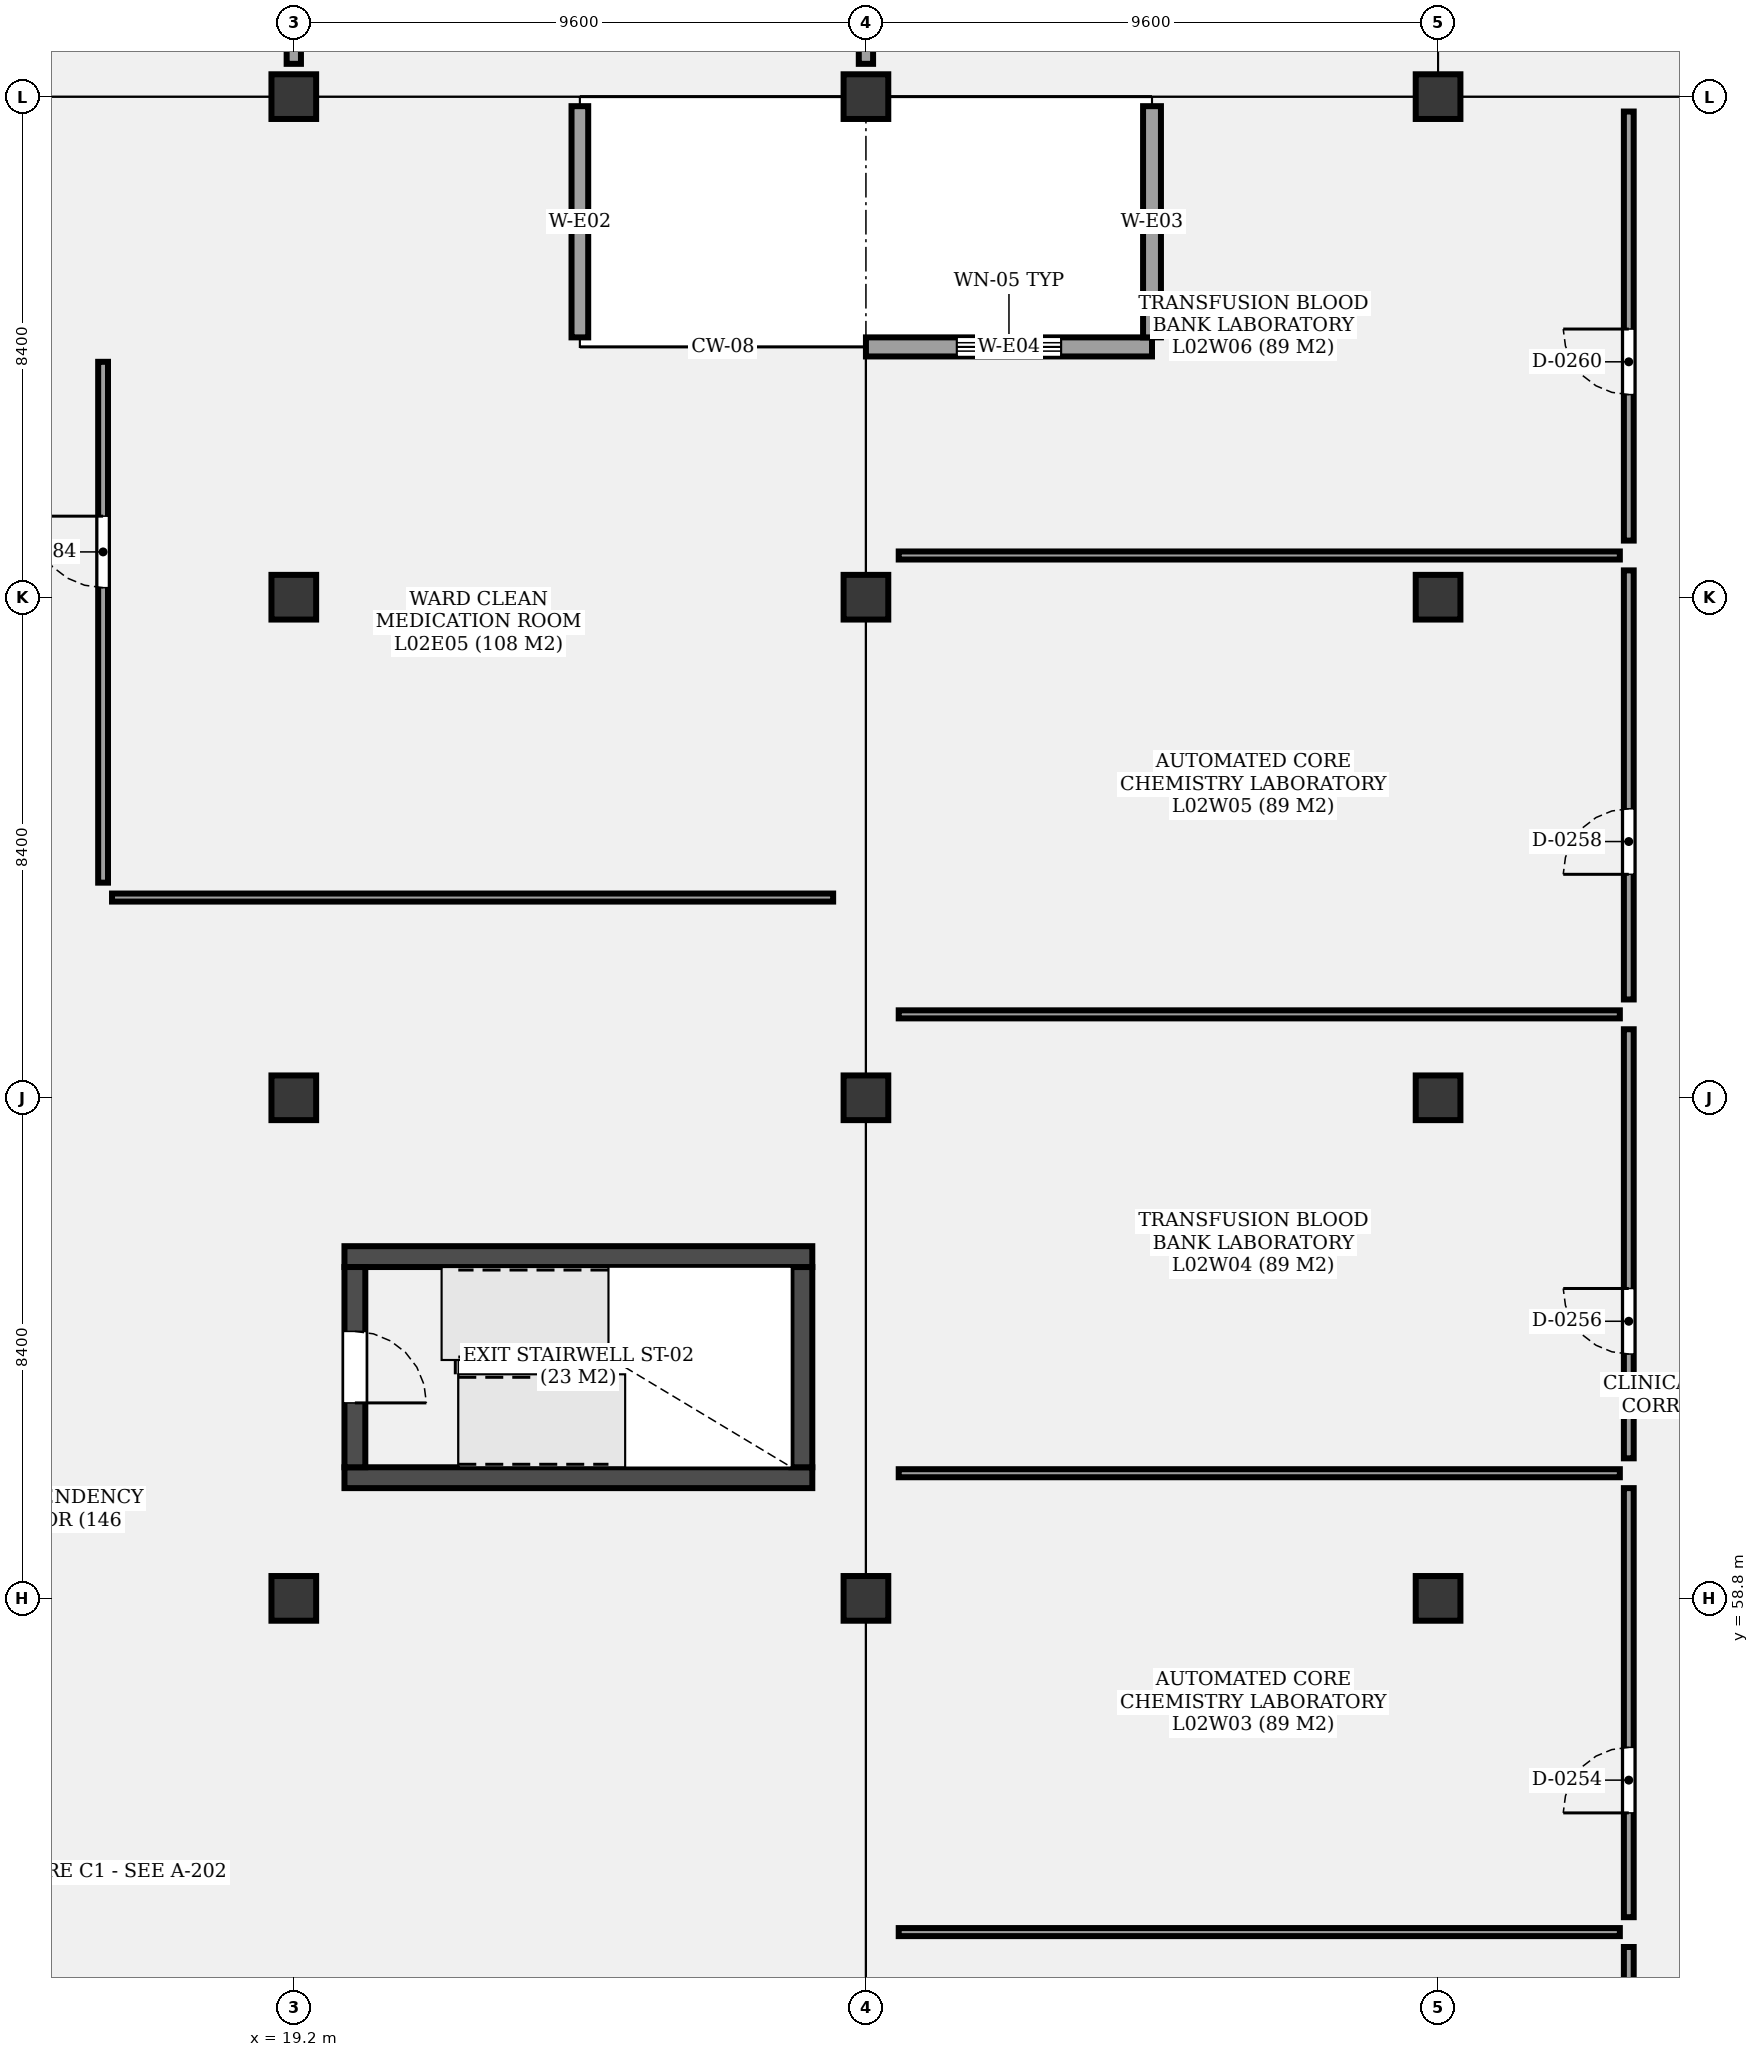
"""IFC4 building model, lengths in metres.
Left out: names, types, materials, properties, quantities, classifications, styles, units other than length and angle.
Written with IfcOpenShell. Run it as: python <this file> out.ifc"""

import sys

from ifc_helpers import new_model, si_unit, direction, frame, frame_2d, origin, origin_2d, place, context, subcontext, project, spatial, rectangle, extrude, element, fill, save


model = new_model("IFC4")
c1 = context("Model", 3, precision=1e-05, world=origin(), true_north=direction((0.0, 1.0)))
c2 = subcontext(c1, "Body", "Model", "MODEL_VIEW")
j1 = project(units=[si_unit("LENGTHUNIT", "METRE"), si_unit("PLANEANGLEUNIT", "RADIAN")], contexts=[c1])
p1 = place(None, origin())
s1 = spatial("IfcSite", under=j1, at=p1, CompositionType="ELEMENT")
p2 = place(p1, origin())
s2 = spatial("IfcBuilding", under=s1, at=p2, CompositionType="ELEMENT")
p3 = place(p2, frame((0.0, 0.0, 9.9)))
s3 = spatial("IfcBuildingStorey", under=s2, at=p3, CompositionType="ELEMENT", Elevation=9.9)
for number, where, z_axis, x_axis in (
    (1, (19.2, 58.8, 0.0), (0.0, 0.0, 1.0), (1.0, 0.0, 0.0)),
    (2, (19.2, 67.2, 0.0), (0.0, 0.0, 1.0), (1.0, 0.0, 0.0)),
    (3, (19.2, 75.6, 0.0), (0.0, 0.0, 1.0), (1.0, 0.0, 0.0)),
    (4, (19.2, 84.0, 0.0), (0.0, 0.0, 1.0), (1.0, 0.0, 0.0)),
    (5, (28.8, 58.8, 0.0), (0.0, 0.0, 1.0), (1.0, 0.0, 0.0)),
    (6, (28.8, 67.2, 0.0), (0.0, 0.0, 1.0), (1.0, 0.0, 0.0)),
    (7, (28.8, 75.6, 0.0), (0.0, 0.0, 1.0), (1.0, 0.0, 0.0)),
    (8, (28.8, 84.0, 0.0), (0.0, 0.0, 1.0), (1.0, 0.0, 0.0)),
    (9, (38.4, 58.8, 0.0), (0.0, 0.0, 1.0), (1.0, 0.0, 0.0)),
    (10, (38.4, 67.2, 0.0), (0.0, 0.0, 1.0), (1.0, 0.0, 0.0)),
    (11, (38.4, 75.6, 0.0), (0.0, 0.0, 1.0), (1.0, 0.0, 0.0)),
    (12, (38.4, 84.0, 0.0), (0.0, 0.0, 1.0), (1.0, 0.0, 0.0)),
):
    element("IfcColumn", number, at=place(p3, frame(where, z_axis=z_axis, x_axis=x_axis)), inside=s3, PredefinedType="COLUMN", context=c2, shape_type="SweptSolid", body=[
        extrude(rectangle(XDim=0.75, YDim=0.75, at=origin_2d()), origin(), (0.0, 0.0, 1.0), 3.6),
    ])
p4 = place(p3, frame((20.05, 60.825, 0.0), z_axis=(0.0, 0.0, 1.0), x_axis=(1.0, 0.0, 0.0)))
e13 = element("IfcWall", 13, at=p4, inside=s3, PredefinedType="SHEAR", context=c2, shape_type="SweptSolid", body=[
    extrude(rectangle(XDim=7.85, YDim=0.35, at=frame_2d((3.925, 0.0))), origin(), (0.0, 0.0, 1.0), 3.6),
])
p5 = place(p3, frame((27.725, 61.0, 0.0), z_axis=(0.0, 0.0, 1.0), x_axis=(0.0, 1.0, 0.0)))
e14 = element("IfcWall", 14, at=p5, inside=s3, PredefinedType="SHEAR", context=c2, shape_type="SweptSolid", body=[
    extrude(rectangle(XDim=3.36, YDim=0.35, at=frame_2d((1.68, 0.0))), origin(), (0.0, 0.0, 1.0), 3.6),
])
p6 = place(p3, frame((27.9, 64.535, 0.0), z_axis=(0.0, 0.0, 1.0), x_axis=(-1.0, 0.0, 0.0)))
e15 = element("IfcWall", 15, at=p6, inside=s3, PredefinedType="SHEAR", context=c2, shape_type="SweptSolid", body=[
    extrude(rectangle(XDim=7.85, YDim=0.35, at=frame_2d((3.925, 0.0))), origin(), (0.0, 0.0, 1.0), 3.6),
])
p7 = place(p3, frame((20.225, 64.36, 0.0), z_axis=(0.0, 0.0, 1.0), x_axis=(0.0, -1.0, 0.0)))
e16 = element("IfcWall", 16, at=p7, inside=s3, PredefinedType="SHEAR", context=c2, shape_type="SweptSolid", body=[
    extrude(rectangle(XDim=3.36, YDim=0.35, at=frame_2d((1.68, 0.0))), origin(), (0.0, 0.0, 1.0), 3.6),
])
p8 = place(p7, frame((1.08, 0.0, 0.0)))
e17 = element("IfcOpeningElement", 17, at=p8, cuts=e16, PredefinedType="OPENING", context=c2, shape_type="SweptSolid", body=[
    extrude(rectangle(XDim=1.2, YDim=2.2, at=frame_2d((0.6, 1.1))), frame((0.0, 0.185, 0.0), z_axis=(0.0, -1.0, 0.0), x_axis=(1.0, 0.0, 0.0)), (0.0, 0.0, 1.0), 0.37),
])
p9 = place(p3, frame((28.8, 79.8, 0.0), z_axis=(0.0, 0.0, 1.0), x_axis=(1.0, 0.0, 0.0)))
e18 = element("IfcWall", 18, at=p9, inside=s3, PredefinedType="SOLIDWALL", context=c2, shape_type="SweptSolid", body=[
    extrude(rectangle(XDim=4.8, YDim=0.32, at=frame_2d((2.4, 0.0))), origin(), (0.0, 0.0, 1.0), 2.57),
])
p10 = place(p9, frame((1.525, 0.0, 0.85)))
e19 = element("IfcOpeningElement", 19, at=p10, cuts=e18, PredefinedType="OPENING", context=c2, shape_type="SweptSolid", body=[
    extrude(rectangle(XDim=1.75, YDim=1.2, at=frame_2d((0.875, 0.6))), frame((0.0, 0.17, 0.0), z_axis=(0.0, -1.0, 0.0), x_axis=(1.0, 0.0, 0.0)), (0.0, 0.0, 1.0), 0.34),
])
p11 = place(p3, frame((24.0, 83.84, 0.0), z_axis=(0.0, 0.0, 1.0), x_axis=(0.0, -1.0, 0.0)))
e20 = element("IfcWall", 20, at=p11, inside=s3, PredefinedType="SOLIDWALL", context=c2, shape_type="SweptSolid", body=[
    extrude(rectangle(XDim=3.88, YDim=0.28, at=frame_2d((1.94, 0.0))), origin(), (0.0, 0.0, 1.0), 2.57),
])
p12 = place(p3, frame((33.6, 79.96, 0.0), z_axis=(0.0, 0.0, 1.0), x_axis=(0.0, 1.0, 0.0)))
e21 = element("IfcWall", 21, at=p12, inside=s3, PredefinedType="SOLIDWALL", context=c2, shape_type="SweptSolid", body=[
    extrude(rectangle(XDim=3.88, YDim=0.3, at=frame_2d((1.94, 0.0))), origin(), (0.0, 0.0, 1.0), 2.57),
])
for number, where, z_axis, x_axis in (
    (22, (19.2, 84.55, 0.0), (0.0, 0.0, 1.0), (0.0, 1.0, 0.0)),
    (23, (28.8, 84.55, 0.0), (0.0, 0.0, 1.0), (0.0, 1.0, 0.0)),
):
    element("IfcWall", number, at=place(p3, frame(where, z_axis=z_axis, x_axis=x_axis)), inside=s3, PredefinedType="PARTITIONING", context=c2, shape_type="SweptSolid", body=[
        extrude(rectangle(XDim=17.3, YDim=0.24, at=frame_2d((8.65, 0.0))), origin(), (0.0, 0.0, 1.0), 2.48),
    ])
p13 = place(p3, frame((41.6, 45.75, 0.0), z_axis=(0.0, 0.0, 1.0), x_axis=(0.0, 1.0, 0.0)))
e24 = element("IfcWall", 24, at=p13, inside=s3, PredefinedType="PARTITIONING", context=c2, shape_type="SweptSolid", body=[
    extrude(rectangle(XDim=7.2, YDim=0.165, at=frame_2d((3.6, 0.0))), origin(), (0.0, 0.0, 1.0), 2.48),
])
p14 = place(p13, frame((1.75, 0.0, 0.0)))
e25 = element("IfcOpeningElement", 25, at=p14, cuts=e24, PredefinedType="OPENING", context=c2, shape_type="SweptSolid", body=[
    extrude(rectangle(XDim=1.1, YDim=2.4, at=frame_2d((0.55, 1.2))), frame((0.0, 0.093, 0.0), z_axis=(0.0, -1.0, 0.0), x_axis=(1.0, 0.0, 0.0)), (0.0, 0.0, 1.0), 0.185),
])
p15 = place(p3, frame((41.6, 53.45, 0.0), z_axis=(0.0, 0.0, 1.0), x_axis=(0.0, 1.0, 0.0)))
e26 = element("IfcWall", 26, at=p15, inside=s3, PredefinedType="PARTITIONING", context=c2, shape_type="SweptSolid", body=[
    extrude(rectangle(XDim=7.2, YDim=0.165, at=frame_2d((3.6, 0.0))), origin(), (0.0, 0.0, 1.0), 2.48),
])
p16 = place(p15, frame((1.75, 0.0, 0.0)))
e27 = element("IfcOpeningElement", 27, at=p16, cuts=e26, PredefinedType="OPENING", context=c2, shape_type="SweptSolid", body=[
    extrude(rectangle(XDim=1.1, YDim=2.4, at=frame_2d((0.55, 1.2))), frame((0.0, 0.093, 0.0), z_axis=(0.0, -1.0, 0.0), x_axis=(1.0, 0.0, 0.0)), (0.0, 0.0, 1.0), 0.185),
])
p17 = place(p3, frame((29.35, 53.2, 0.0), z_axis=(0.0, 0.0, 1.0), x_axis=(1.0, 0.0, 0.0)))
e28 = element("IfcWall", 28, at=p17, inside=s3, PredefinedType="PARTITIONING", context=c2, shape_type="SweptSolid", body=[
    extrude(rectangle(XDim=12.1, YDim=0.135, at=frame_2d((6.05, 0.0))), origin(), (0.0, 0.0, 1.0), 2.48),
])
p18 = place(p3, frame((41.6, 61.15, 0.0), z_axis=(0.0, 0.0, 1.0), x_axis=(0.0, 1.0, 0.0)))
e29 = element("IfcWall", 29, at=p18, inside=s3, PredefinedType="PARTITIONING", context=c2, shape_type="SweptSolid", body=[
    extrude(rectangle(XDim=7.2, YDim=0.165, at=frame_2d((3.6, 0.0))), origin(), (0.0, 0.0, 1.0), 2.48),
])
p19 = place(p18, frame((1.75, 0.0, 0.0)))
e30 = element("IfcOpeningElement", 30, at=p19, cuts=e29, PredefinedType="OPENING", context=c2, shape_type="SweptSolid", body=[
    extrude(rectangle(XDim=1.1, YDim=2.4, at=frame_2d((0.55, 1.2))), frame((0.0, 0.093, 0.0), z_axis=(0.0, -1.0, 0.0), x_axis=(1.0, 0.0, 0.0)), (0.0, 0.0, 1.0), 0.185),
])
p20 = place(p3, frame((29.35, 60.9, 0.0), z_axis=(0.0, 0.0, 1.0), x_axis=(1.0, 0.0, 0.0)))
e31 = element("IfcWall", 31, at=p20, inside=s3, PredefinedType="PARTITIONING", context=c2, shape_type="SweptSolid", body=[
    extrude(rectangle(XDim=12.1, YDim=0.135, at=frame_2d((6.05, 0.0))), origin(), (0.0, 0.0, 1.0), 2.48),
])
p21 = place(p3, frame((41.6, 68.85, 0.0), z_axis=(0.0, 0.0, 1.0), x_axis=(0.0, 1.0, 0.0)))
e32 = element("IfcWall", 32, at=p21, inside=s3, PredefinedType="PARTITIONING", context=c2, shape_type="SweptSolid", body=[
    extrude(rectangle(XDim=7.2, YDim=0.165, at=frame_2d((3.6, 0.0))), origin(), (0.0, 0.0, 1.0), 2.48),
])
p22 = place(p21, frame((2.1, 0.0, 0.0)))
e33 = element("IfcOpeningElement", 33, at=p22, cuts=e32, PredefinedType="OPENING", context=c2, shape_type="SweptSolid", body=[
    extrude(rectangle(XDim=1.1, YDim=2.4, at=frame_2d((0.55, 1.2))), frame((0.0, 0.093, 0.0), z_axis=(0.0, -1.0, 0.0), x_axis=(1.0, 0.0, 0.0)), (0.0, 0.0, 1.0), 0.185),
])
p23 = place(p3, frame((29.35, 68.6, 0.0), z_axis=(0.0, 0.0, 1.0), x_axis=(1.0, 0.0, 0.0)))
e34 = element("IfcWall", 34, at=p23, inside=s3, PredefinedType="PARTITIONING", context=c2, shape_type="SweptSolid", body=[
    extrude(rectangle(XDim=12.1, YDim=0.135, at=frame_2d((6.05, 0.0))), origin(), (0.0, 0.0, 1.0), 2.48),
])
p24 = place(p3, frame((41.6, 76.55, 0.0), z_axis=(0.0, 0.0, 1.0), x_axis=(0.0, 1.0, 0.0)))
e35 = element("IfcWall", 35, at=p24, inside=s3, PredefinedType="PARTITIONING", context=c2, shape_type="SweptSolid", body=[
    extrude(rectangle(XDim=7.2, YDim=0.165, at=frame_2d((3.6, 0.0))), origin(), (0.0, 0.0, 1.0), 2.48),
])
p25 = place(p24, frame((2.45, 0.0, 0.0)))
e36 = element("IfcOpeningElement", 36, at=p25, cuts=e35, PredefinedType="OPENING", context=c2, shape_type="SweptSolid", body=[
    extrude(rectangle(XDim=1.1, YDim=2.4, at=frame_2d((0.55, 1.2))), frame((0.0, 0.093, 0.0), z_axis=(0.0, -1.0, 0.0), x_axis=(1.0, 0.0, 0.0)), (0.0, 0.0, 1.0), 0.185),
])
p26 = place(p3, frame((29.35, 76.3, 0.0), z_axis=(0.0, 0.0, 1.0), x_axis=(1.0, 0.0, 0.0)))
e37 = element("IfcWall", 37, at=p26, inside=s3, PredefinedType="PARTITIONING", context=c2, shape_type="SweptSolid", body=[
    extrude(rectangle(XDim=12.1, YDim=0.135, at=frame_2d((6.05, 0.0))), origin(), (0.0, 0.0, 1.0), 2.48),
])
p27 = place(p3, frame((16.0, 70.81, 0.0), z_axis=(0.0, 0.0, 1.0), x_axis=(0.0, 1.0, 0.0)))
e38 = element("IfcWall", 38, at=p27, inside=s3, PredefinedType="PARTITIONING", context=c2, shape_type="SweptSolid", body=[
    extrude(rectangle(XDim=8.74, YDim=0.165, at=frame_2d((4.37, 0.0))), origin(), (0.0, 0.0, 1.0), 2.48),
])
p28 = place(p27, frame((4.95, 0.0, 0.0)))
e39 = element("IfcOpeningElement", 39, at=p28, cuts=e38, PredefinedType="OPENING", context=c2, shape_type="SweptSolid", body=[
    extrude(rectangle(XDim=1.2, YDim=2.4, at=frame_2d((0.6, 1.2))), frame((0.0, 0.093, 0.0), z_axis=(0.0, -1.0, 0.0), x_axis=(1.0, 0.0, 0.0)), (0.0, 0.0, 1.0), 0.185),
])
p29 = place(p3, frame((16.15, 70.56, 0.0), z_axis=(0.0, 0.0, 1.0), x_axis=(1.0, 0.0, 0.0)))
e40 = element("IfcWall", 40, at=p29, inside=s3, PredefinedType="PARTITIONING", context=c2, shape_type="SweptSolid", body=[
    extrude(rectangle(XDim=12.1, YDim=0.135, at=frame_2d((6.05, 0.0))), origin(), (0.0, 0.0, 1.0), 2.48),
])
p30 = place(p8, origin())
e41 = element("IfcDoor", 41, at=p30, inside=s3, OperationType="SINGLE_SWING_RIGHT", PredefinedType="DOOR", context=c2, shape_type="SweptSolid", body=[
    extrude(rectangle(XDim=1.2, YDim=2.2, at=frame_2d((0.6, 1.1))), frame((0.0, 0.025, 0.0), z_axis=(0.0, -1.0, 0.0), x_axis=(1.0, 0.0, 0.0)), (0.0, 0.0, 1.0), 0.05),
])
fill(e17, e41)
p31 = place(p10, origin())
e42 = element("IfcWindow", 42, at=p31, inside=s3, PartitioningType="SINGLE_PANEL", PredefinedType="WINDOW", context=c2, shape_type="SweptSolid", body=[
    extrude(rectangle(XDim=1.75, YDim=1.2, at=frame_2d((0.875, 0.6))), frame((0.0, 0.03, 0.0), z_axis=(0.0, -1.0, 0.0), x_axis=(1.0, 0.0, 0.0)), (0.0, 0.0, 1.0), 0.06),
])
fill(e19, e42)
p32 = place(p16, origin())
e43 = element("IfcDoor", 43, at=p32, inside=s3, OperationType="SINGLE_SWING_LEFT", PredefinedType="DOOR", context=c2, shape_type="SweptSolid", body=[
    extrude(rectangle(XDim=1.1, YDim=2.4, at=frame_2d((0.55, 1.2))), frame((0.0, 0.025, 0.0), z_axis=(0.0, -1.0, 0.0), x_axis=(1.0, 0.0, 0.0)), (0.0, 0.0, 1.0), 0.05),
])
fill(e27, e43)
p33 = place(p19, origin())
e44 = element("IfcDoor", 44, at=p33, inside=s3, OperationType="SINGLE_SWING_RIGHT", PredefinedType="DOOR", context=c2, shape_type="SweptSolid", body=[
    extrude(rectangle(XDim=1.1, YDim=2.4, at=frame_2d((0.55, 1.2))), frame((0.0, 0.025, 0.0), z_axis=(0.0, -1.0, 0.0), x_axis=(1.0, 0.0, 0.0)), (0.0, 0.0, 1.0), 0.05),
])
fill(e30, e44)
p34 = place(p22, origin())
e45 = element("IfcDoor", 45, at=p34, inside=s3, OperationType="SINGLE_SWING_LEFT", PredefinedType="DOOR", context=c2, shape_type="SweptSolid", body=[
    extrude(rectangle(XDim=1.1, YDim=2.4, at=frame_2d((0.55, 1.2))), frame((0.0, 0.025, 0.0), z_axis=(0.0, -1.0, 0.0), x_axis=(1.0, 0.0, 0.0)), (0.0, 0.0, 1.0), 0.05),
])
fill(e33, e45)
p35 = place(p25, origin())
e46 = element("IfcDoor", 46, at=p35, inside=s3, OperationType="SINGLE_SWING_RIGHT", PredefinedType="DOOR", context=c2, shape_type="SweptSolid", body=[
    extrude(rectangle(XDim=1.1, YDim=2.4, at=frame_2d((0.55, 1.2))), frame((0.0, 0.025, 0.0), z_axis=(0.0, -1.0, 0.0), x_axis=(1.0, 0.0, 0.0)), (0.0, 0.0, 1.0), 0.05),
])
fill(e36, e46)
p36 = place(p28, origin())
e47 = element("IfcDoor", 47, at=p36, inside=s3, OperationType="SINGLE_SWING_RIGHT", PredefinedType="DOOR", context=c2, shape_type="SweptSolid", body=[
    extrude(rectangle(XDim=1.2, YDim=2.4, at=frame_2d((0.6, 1.2))), frame((0.0, 0.025, 0.0), z_axis=(0.0, -1.0, 0.0), x_axis=(1.0, 0.0, 0.0)), (0.0, 0.0, 1.0), 0.05),
])
fill(e39, e47)
save(model, sys.argv[1])
